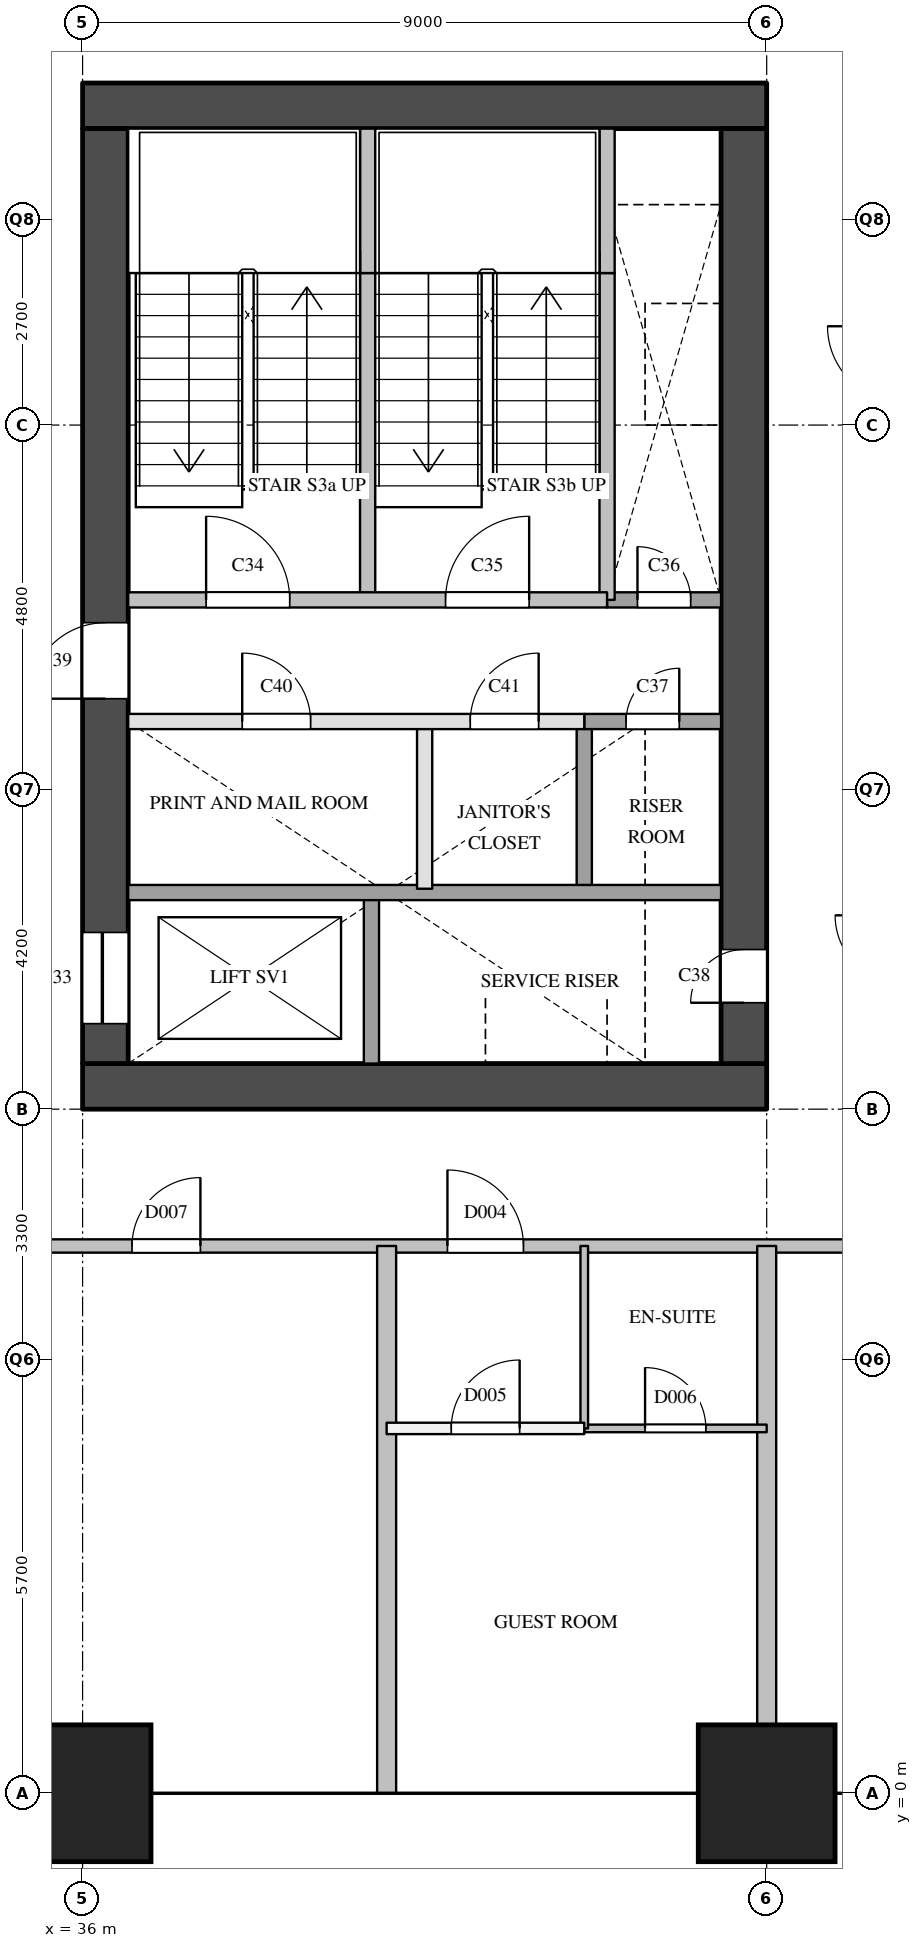
"""IFC4 building model, lengths in metres.
Left out: names, types, materials, properties, quantities, classifications, styles, units other than length and angle.
Written with IfcOpenShell. Run it as: python <this file> out.ifc"""

import sys

from ifc_helpers import new_model, si_unit, direction, frame, frame_2d, origin, origin_2d, place, context, subcontext, project, spatial, rectangle, extrude, element, fill, save


model = new_model("IFC4")
c1 = context("Model", 3, precision=1e-05, world=origin(), true_north=direction((0.0, 1.0)))
c2 = subcontext(c1, "Body", "Model", "MODEL_VIEW")
j1 = project(units=[si_unit("LENGTHUNIT", "METRE"), si_unit("PLANEANGLEUNIT", "RADIAN")], contexts=[c1])
p1 = place(None, origin())
s1 = spatial("IfcSite", under=j1, at=p1, CompositionType="ELEMENT")
p2 = place(p1, origin())
s2 = spatial("IfcBuilding", under=s1, at=p2, CompositionType="ELEMENT")
p3 = place(p2, frame((0.0, 0.0, 42.4)))
s3 = spatial("IfcBuildingStorey", under=s2, at=p3, CompositionType="ELEMENT", Elevation=42.4)
for number, where, z_axis, x_axis in (
    (1, (36.0, 0.0, 0.0), (0.0, 0.0, 1.0), (1.0, 0.0, 0.0)),
    (2, (45.0, 0.0, 0.0), (0.0, 0.0, 1.0), (1.0, 0.0, 0.0)),
):
    element("IfcColumn", number, at=place(p3, frame(where, z_axis=z_axis, x_axis=x_axis)), inside=s3, PredefinedType="COLUMN", context=c2, shape_type="SweptSolid", body=[
        extrude(rectangle(XDim=1.8, YDim=1.8, at=origin_2d()), origin(), (0.0, 0.0, 1.0), 3.8),
    ])
for number, where, z_axis, x_axis in (
    (3, (36.0, 9.3, 0.0), (0.0, 0.0, 1.0), (1.0, 0.0, 0.0)),
    (4, (36.0, 22.2, 0.0), (0.0, 0.0, 1.0), (1.0, 0.0, 0.0)),
):
    element("IfcWall", number, at=place(p3, frame(where, z_axis=z_axis, x_axis=x_axis)), inside=s3, PredefinedType="SHEAR", context=c2, shape_type="SweptSolid", body=[
        extrude(rectangle(XDim=9.0, YDim=0.6, at=frame_2d((4.5, 0.0))), origin(), (0.0, 0.0, 1.0), 3.5),
    ])
p4 = place(p3, frame((36.3, 9.6, 0.0), z_axis=(0.0, 0.0, 1.0), x_axis=(0.0, 1.0, 0.0)))
e5 = element("IfcWall", 5, at=p4, inside=s3, PredefinedType="SHEAR", context=c2, shape_type="SweptSolid", body=[
    extrude(rectangle(XDim=12.3, YDim=0.6, at=frame_2d((6.15, 0.0))), origin(), (0.0, 0.0, 1.0), 3.5),
])
p5 = place(p4, frame((0.525, 0.0, 0.0)))
e6 = element("IfcOpeningElement", 6, at=p5, cuts=e5, PredefinedType="OPENING", context=c2, shape_type="SweptSolid", body=[
    extrude(rectangle(XDim=1.2, YDim=2.1, at=frame_2d((0.6, 1.05))), frame((0.0, 0.31, 0.0), z_axis=(0.0, -1.0, 0.0), x_axis=(1.0, 0.0, 0.0)), (0.0, 0.0, 1.0), 0.62),
])
p6 = place(p4, frame((4.8, 0.0, 0.0)))
e7 = element("IfcOpeningElement", 7, at=p6, cuts=e5, PredefinedType="OPENING", context=c2, shape_type="SweptSolid", body=[
    extrude(rectangle(XDim=1.0, YDim=2.1, at=frame_2d((0.5, 1.05))), frame((0.0, 0.31, 0.0), z_axis=(0.0, -1.0, 0.0), x_axis=(1.0, 0.0, 0.0)), (0.0, 0.0, 1.0), 0.62),
])
p7 = place(p3, frame((44.7, 9.6, 0.0), z_axis=(0.0, 0.0, 1.0), x_axis=(0.0, 1.0, 0.0)))
e8 = element("IfcWall", 8, at=p7, inside=s3, PredefinedType="SHEAR", context=c2, shape_type="SweptSolid", body=[
    extrude(rectangle(XDim=12.3, YDim=0.6, at=frame_2d((6.15, 0.0))), origin(), (0.0, 0.0, 1.0), 3.5),
])
p8 = place(p7, frame((0.8, 0.0, 0.0)))
e9 = element("IfcOpeningElement", 9, at=p8, cuts=e8, PredefinedType="OPENING", context=c2, shape_type="SweptSolid", body=[
    extrude(rectangle(XDim=0.7, YDim=2.1, at=frame_2d((0.35, 1.05))), frame((0.0, 0.31, 0.0), z_axis=(0.0, -1.0, 0.0), x_axis=(1.0, 0.0, 0.0)), (0.0, 0.0, 1.0), 0.62),
])
p9 = place(p3, frame((39.75, 15.7, 0.0), z_axis=(0.0, 0.0, 1.0), x_axis=(0.0, 1.0, 0.0)))
e10 = element("IfcWall", 10, at=p9, inside=s3, PredefinedType="SOLIDWALL", context=c2, shape_type="SweptSolid", body=[
    extrude(rectangle(XDim=4.3, YDim=0.2, at=frame_2d((2.15, 0.0))), origin(), (0.0, 0.0, 1.0), 3.5),
])
p10 = place(p3, frame((39.75, 20.0, 0.0), z_axis=(0.0, 0.0, 1.0), x_axis=(0.0, 1.0, 0.0)))
e11 = element("IfcWall", 11, at=p10, inside=s3, PredefinedType="SOLIDWALL", context=c2, shape_type="SweptSolid", body=[
    extrude(rectangle(XDim=1.9, YDim=0.2, at=frame_2d((0.95, 0.0))), origin(), (0.0, 0.0, 1.0), 3.5),
])
p11 = place(p3, frame((39.8, 9.6, 0.0), z_axis=(0.0, 0.0, 1.0), x_axis=(0.0, 1.0, 0.0)))
e12 = element("IfcWall", 12, at=p11, inside=s3, PredefinedType="SOLIDWALL", context=c2, shape_type="SweptSolid", body=[
    extrude(rectangle(XDim=2.3, YDim=0.2, at=frame_2d((1.15, 0.0))), origin(), (0.0, 0.0, 1.0), 3.5),
])
p12 = place(p3, frame((40.5, 11.9, 0.0), z_axis=(0.0, 0.0, 1.0), x_axis=(0.0, 1.0, 0.0)))
e13 = element("IfcWall", 13, at=p12, inside=s3, PredefinedType="PARTITIONING", context=c2, shape_type="SweptSolid", body=[
    extrude(rectangle(XDim=2.2, YDim=0.2, at=frame_2d((1.1, 0.0))), origin(), (0.0, 0.0, 1.0), 3.5),
])
p13 = place(p3, frame((42.6, 11.9, 0.0), z_axis=(0.0, 0.0, 1.0), x_axis=(0.0, 1.0, 0.0)))
e14 = element("IfcWall", 14, at=p13, inside=s3, PredefinedType="SOLIDWALL", context=c2, shape_type="SweptSolid", body=[
    extrude(rectangle(XDim=2.2, YDim=0.2, at=frame_2d((1.1, 0.0))), origin(), (0.0, 0.0, 1.0), 3.5),
])
p14 = place(p3, frame((42.9, 15.7, 0.0), z_axis=(0.0, 0.0, 1.0), x_axis=(0.0, 1.0, 0.0)))
e15 = element("IfcWall", 15, at=p14, inside=s3, PredefinedType="SOLIDWALL", context=c2, shape_type="SweptSolid", body=[
    extrude(rectangle(XDim=4.3, YDim=0.2, at=frame_2d((2.15, 0.0))), origin(), (0.0, 0.0, 1.0), 3.5),
])
p15 = place(p3, frame((42.9, 20.0, 0.0), z_axis=(0.0, 0.0, 1.0), x_axis=(0.0, 1.0, 0.0)))
e16 = element("IfcWall", 16, at=p15, inside=s3, PredefinedType="SOLIDWALL", context=c2, shape_type="SweptSolid", body=[
    extrude(rectangle(XDim=1.9, YDim=0.2, at=frame_2d((0.95, 0.0))), origin(), (0.0, 0.0, 1.0), 3.5),
])
p16 = place(p3, frame((36.6, 11.85, 0.0), z_axis=(0.0, 0.0, 1.0), x_axis=(1.0, 0.0, 0.0)))
e17 = element("IfcWall", 17, at=p16, inside=s3, PredefinedType="SOLIDWALL", context=c2, shape_type="SweptSolid", body=[
    extrude(rectangle(XDim=7.8, YDim=0.2, at=frame_2d((3.9, 0.0))), origin(), (0.0, 0.0, 1.0), 3.5),
])
p17 = place(p3, frame((36.6, 14.1, 0.0), z_axis=(0.0, 0.0, 1.0), x_axis=(1.0, 0.0, 0.0)))
e18 = element("IfcWall", 18, at=p17, inside=s3, PredefinedType="PARTITIONING", context=c2, shape_type="SweptSolid", body=[
    extrude(rectangle(XDim=6.0, YDim=0.2, at=frame_2d((3.0, 0.0))), origin(), (0.0, 0.0, 1.0), 3.5),
])
p18 = place(p17, frame((1.5, 0.0, 0.0)))
e19 = element("IfcOpeningElement", 19, at=p18, cuts=e18, PredefinedType="OPENING", context=c2, shape_type="SweptSolid", body=[
    extrude(rectangle(XDim=0.9, YDim=2.1, at=frame_2d((0.45, 1.05))), frame((0.0, 0.11, 0.0), z_axis=(0.0, -1.0, 0.0), x_axis=(1.0, 0.0, 0.0)), (0.0, 0.0, 1.0), 0.22),
])
p19 = place(p17, frame((4.5, 0.0, 0.0)))
e20 = element("IfcOpeningElement", 20, at=p19, cuts=e18, PredefinedType="OPENING", context=c2, shape_type="SweptSolid", body=[
    extrude(rectangle(XDim=0.9, YDim=2.1, at=frame_2d((0.45, 1.05))), frame((0.0, 0.11, 0.0), z_axis=(0.0, -1.0, 0.0), x_axis=(1.0, 0.0, 0.0)), (0.0, 0.0, 1.0), 0.22),
])
p20 = place(p3, frame((42.6, 14.1, 0.0), z_axis=(0.0, 0.0, 1.0), x_axis=(1.0, 0.0, 0.0)))
e21 = element("IfcWall", 21, at=p20, inside=s3, PredefinedType="SOLIDWALL", context=c2, shape_type="SweptSolid", body=[
    extrude(rectangle(XDim=1.8, YDim=0.2, at=frame_2d((0.9, 0.0))), origin(), (0.0, 0.0, 1.0), 3.5),
])
p21 = place(p20, frame((0.55, 0.0, 0.0)))
e22 = element("IfcOpeningElement", 22, at=p21, cuts=e21, PredefinedType="OPENING", context=c2, shape_type="SweptSolid", body=[
    extrude(rectangle(XDim=0.7, YDim=2.1, at=frame_2d((0.35, 1.05))), frame((0.0, 0.11, 0.0), z_axis=(0.0, -1.0, 0.0), x_axis=(1.0, 0.0, 0.0)), (0.0, 0.0, 1.0), 0.22),
])
p22 = place(p3, frame((42.9, 15.7, 0.0), z_axis=(0.0, 0.0, 1.0), x_axis=(1.0, 0.0, 0.0)))
e23 = element("IfcWall", 23, at=p22, inside=s3, PredefinedType="SOLIDWALL", context=c2, shape_type="SweptSolid", body=[
    extrude(rectangle(XDim=1.5, YDim=0.2, at=frame_2d((0.75, 0.0))), origin(), (0.0, 0.0, 1.0), 3.5),
])
p23 = place(p22, frame((0.4, 0.0, 0.0)))
e24 = element("IfcOpeningElement", 24, at=p23, cuts=e23, PredefinedType="OPENING", context=c2, shape_type="SweptSolid", body=[
    extrude(rectangle(XDim=0.7, YDim=2.1, at=frame_2d((0.35, 1.05))), frame((0.0, 0.11, 0.0), z_axis=(0.0, -1.0, 0.0), x_axis=(1.0, 0.0, 0.0)), (0.0, 0.0, 1.0), 0.22),
])
p24 = place(p3, frame((36.6, 15.7, 0.0), z_axis=(0.0, 0.0, 1.0), x_axis=(1.0, 0.0, 0.0)))
e25 = element("IfcWall", 25, at=p24, inside=s3, PredefinedType="SOLIDWALL", context=c2, shape_type="SweptSolid", body=[
    extrude(rectangle(XDim=6.3, YDim=0.2, at=frame_2d((3.15, 0.0))), origin(), (0.0, 0.0, 1.0), 3.5),
])
p25 = place(p24, frame((1.025, 0.0, 0.0)))
e26 = element("IfcOpeningElement", 26, at=p25, cuts=e25, PredefinedType="OPENING", context=c2, shape_type="SweptSolid", body=[
    extrude(rectangle(XDim=1.1, YDim=2.1, at=frame_2d((0.55, 1.05))), frame((0.0, 0.11, 0.0), z_axis=(0.0, -1.0, 0.0), x_axis=(1.0, 0.0, 0.0)), (0.0, 0.0, 1.0), 0.22),
])
p26 = place(p24, frame((4.175, 0.0, 0.0)))
e27 = element("IfcOpeningElement", 27, at=p26, cuts=e25, PredefinedType="OPENING", context=c2, shape_type="SweptSolid", body=[
    extrude(rectangle(XDim=1.1, YDim=2.1, at=frame_2d((0.55, 1.05))), frame((0.0, 0.11, 0.0), z_axis=(0.0, -1.0, 0.0), x_axis=(1.0, 0.0, 0.0)), (0.0, 0.0, 1.0), 0.22),
])
p27 = place(p3, frame((34.2, 7.2, 0.0), z_axis=(0.0, 0.0, 1.0), x_axis=(1.0, 0.0, 0.0)))
e28 = element("IfcWall", 28, at=p27, inside=s3, PredefinedType="PARTITIONING", context=c2, shape_type="SweptSolid", body=[
    extrude(rectangle(XDim=12.6, YDim=0.175, at=frame_2d((6.3, 0.0))), origin(), (0.0, 0.0, 1.0), 3.5),
])
p28 = place(p27, frame((6.6, 0.0, 0.0)))
e29 = element("IfcOpeningElement", 29, at=p28, cuts=e28, PredefinedType="OPENING", context=c2, shape_type="SweptSolid", body=[
    extrude(rectangle(XDim=1.0, YDim=2.1, at=frame_2d((0.5, 1.05))), frame((0.0, 0.097, 0.0), z_axis=(0.0, -1.0, 0.0), x_axis=(1.0, 0.0, 0.0)), (0.0, 0.0, 1.0), 0.195),
])
p29 = place(p27, frame((2.45, 0.0, 0.0)))
e30 = element("IfcOpeningElement", 30, at=p29, cuts=e28, PredefinedType="OPENING", context=c2, shape_type="SweptSolid", body=[
    extrude(rectangle(XDim=0.9, YDim=2.1, at=frame_2d((0.45, 1.05))), frame((0.0, 0.097, 0.0), z_axis=(0.0, -1.0, 0.0), x_axis=(1.0, 0.0, 0.0)), (0.0, 0.0, 1.0), 0.195),
])
p30 = place(p3, frame((40.0, 4.8, 0.0), z_axis=(0.0, 0.0, 1.0), x_axis=(1.0, 0.0, 0.0)))
e31 = element("IfcWall", 31, at=p30, inside=s3, PredefinedType="PARTITIONING", context=c2, shape_type="SweptSolid", body=[
    extrude(rectangle(XDim=2.6, YDim=0.15, at=frame_2d((1.3, 0.0))), origin(), (0.0, 0.0, 1.0), 3.5),
])
p31 = place(p30, frame((0.85, 0.0, 0.0)))
e32 = element("IfcOpeningElement", 32, at=p31, cuts=e31, PredefinedType="OPENING", context=c2, shape_type="SweptSolid", body=[
    extrude(rectangle(XDim=0.9, YDim=2.1, at=frame_2d((0.45, 1.05))), frame((0.0, 0.085, 0.0), z_axis=(0.0, -1.0, 0.0), x_axis=(1.0, 0.0, 0.0)), (0.0, 0.0, 1.0), 0.17),
])
p32 = place(p3, frame((40.0, 0.0, 0.0), z_axis=(0.0, 0.0, 1.0), x_axis=(0.0, 1.0, 0.0)))
e33 = element("IfcWall", 33, at=p32, inside=s3, PredefinedType="PARTITIONING", context=c2, shape_type="SweptSolid", body=[
    extrude(rectangle(XDim=7.2, YDim=0.25, at=frame_2d((3.6, 0.0))), origin(), (0.0, 0.0, 1.0), 2.5),
])
p33 = place(p3, frame((45.0, 0.0, 0.0), z_axis=(0.0, 0.0, 1.0), x_axis=(0.0, 1.0, 0.0)))
e34 = element("IfcWall", 34, at=p33, inside=s3, PredefinedType="PARTITIONING", context=c2, shape_type="SweptSolid", body=[
    extrude(rectangle(XDim=7.2, YDim=0.25, at=frame_2d((3.6, 0.0))), origin(), (0.0, 0.0, 1.0), 3.5),
])
p34 = place(p3, frame((42.6, 4.8, 0.0), z_axis=(0.0, 0.0, 1.0), x_axis=(1.0, 0.0, 0.0)))
e35 = element("IfcWall", 35, at=p34, inside=s3, PredefinedType="PARTITIONING", context=c2, shape_type="SweptSolid", body=[
    extrude(rectangle(XDim=2.4, YDim=0.1, at=frame_2d((1.2, 0.0))), origin(), (0.0, 0.0, 1.0), 3.5),
])
p35 = place(p34, frame((0.8, 0.0, 0.0)))
e36 = element("IfcOpeningElement", 36, at=p35, cuts=e35, PredefinedType="OPENING", context=c2, shape_type="SweptSolid", body=[
    extrude(rectangle(XDim=0.8, YDim=2.1, at=frame_2d((0.4, 1.05))), frame((0.0, 0.06, 0.0), z_axis=(0.0, -1.0, 0.0), x_axis=(1.0, 0.0, 0.0)), (0.0, 0.0, 1.0), 0.12),
])
p36 = place(p3, frame((42.6, 4.8, 0.0), z_axis=(0.0, 0.0, 1.0), x_axis=(0.0, 1.0, 0.0)))
e37 = element("IfcWall", 37, at=p36, inside=s3, PredefinedType="PARTITIONING", context=c2, shape_type="SweptSolid", body=[
    extrude(rectangle(XDim=2.4, YDim=0.1, at=frame_2d((1.2, 0.0))), origin(), (0.0, 0.0, 1.0), 3.5),
])
p37 = place(p5, origin())
e38 = element("IfcDoor", 38, at=p37, inside=s3, OperationType="SLIDING_TO_LEFT", PredefinedType="DOOR", context=c2, shape_type="SweptSolid", body=[
    extrude(rectangle(XDim=1.2, YDim=2.1, at=frame_2d((0.6, 1.05))), frame((0.0, 0.025, 0.0), z_axis=(0.0, -1.0, 0.0), x_axis=(1.0, 0.0, 0.0)), (0.0, 0.0, 1.0), 0.05),
])
fill(e6, e38)
p38 = place(p25, origin())
e39 = element("IfcDoor", 39, at=p38, inside=s3, OperationType="SINGLE_SWING_LEFT", PredefinedType="DOOR", context=c2, shape_type="SweptSolid", body=[
    extrude(rectangle(XDim=1.1, YDim=2.1, at=frame_2d((0.55, 1.05))), frame((0.0, 0.025, 0.0), z_axis=(0.0, -1.0, 0.0), x_axis=(1.0, 0.0, 0.0)), (0.0, 0.0, 1.0), 0.05),
])
fill(e26, e39)
p39 = place(p26, origin())
e40 = element("IfcDoor", 40, at=p39, inside=s3, OperationType="SINGLE_SWING_RIGHT", PredefinedType="DOOR", context=c2, shape_type="SweptSolid", body=[
    extrude(rectangle(XDim=1.1, YDim=2.1, at=frame_2d((0.55, 1.05))), frame((0.0, 0.025, 0.0), z_axis=(0.0, -1.0, 0.0), x_axis=(1.0, 0.0, 0.0)), (0.0, 0.0, 1.0), 0.05),
])
fill(e27, e40)
p40 = place(p23, origin())
e41 = element("IfcDoor", 41, at=p40, inside=s3, OperationType="SINGLE_SWING_LEFT", PredefinedType="DOOR", context=c2, shape_type="SweptSolid", body=[
    extrude(rectangle(XDim=0.7, YDim=2.1, at=frame_2d((0.35, 1.05))), frame((0.0, 0.025, 0.0), z_axis=(0.0, -1.0, 0.0), x_axis=(1.0, 0.0, 0.0)), (0.0, 0.0, 1.0), 0.05),
])
fill(e24, e41)
p41 = place(p21, origin())
e42 = element("IfcDoor", 42, at=p41, inside=s3, OperationType="SINGLE_SWING_RIGHT", PredefinedType="DOOR", context=c2, shape_type="SweptSolid", body=[
    extrude(rectangle(XDim=0.7, YDim=2.1, at=frame_2d((0.35, 1.05))), frame((0.0, 0.025, 0.0), z_axis=(0.0, -1.0, 0.0), x_axis=(1.0, 0.0, 0.0)), (0.0, 0.0, 1.0), 0.05),
])
fill(e22, e42)
p42 = place(p8, origin())
e43 = element("IfcDoor", 43, at=p42, inside=s3, OperationType="SINGLE_SWING_LEFT", PredefinedType="DOOR", context=c2, shape_type="SweptSolid", body=[
    extrude(rectangle(XDim=0.7, YDim=2.1, at=frame_2d((0.35, 1.05))), frame((0.0, 0.025, 0.0), z_axis=(0.0, -1.0, 0.0), x_axis=(1.0, 0.0, 0.0)), (0.0, 0.0, 1.0), 0.05),
])
fill(e9, e43)
p43 = place(p6, origin())
e44 = element("IfcDoor", 44, at=p43, inside=s3, OperationType="SINGLE_SWING_LEFT", PredefinedType="DOOR", context=c2, shape_type="SweptSolid", body=[
    extrude(rectangle(XDim=1.0, YDim=2.1, at=frame_2d((0.5, 1.05))), frame((0.0, 0.025, 0.0), z_axis=(0.0, -1.0, 0.0), x_axis=(1.0, 0.0, 0.0)), (0.0, 0.0, 1.0), 0.05),
])
fill(e7, e44)
p44 = place(p18, origin())
e45 = element("IfcDoor", 45, at=p44, inside=s3, OperationType="SINGLE_SWING_LEFT", PredefinedType="DOOR", context=c2, shape_type="SweptSolid", body=[
    extrude(rectangle(XDim=0.9, YDim=2.1, at=frame_2d((0.45, 1.05))), frame((0.0, 0.025, 0.0), z_axis=(0.0, -1.0, 0.0), x_axis=(1.0, 0.0, 0.0)), (0.0, 0.0, 1.0), 0.05),
])
fill(e19, e45)
p45 = place(p19, origin())
e46 = element("IfcDoor", 46, at=p45, inside=s3, OperationType="SINGLE_SWING_RIGHT", PredefinedType="DOOR", context=c2, shape_type="SweptSolid", body=[
    extrude(rectangle(XDim=0.9, YDim=2.1, at=frame_2d((0.45, 1.05))), frame((0.0, 0.025, 0.0), z_axis=(0.0, -1.0, 0.0), x_axis=(1.0, 0.0, 0.0)), (0.0, 0.0, 1.0), 0.05),
])
fill(e20, e46)
p46 = place(p28, origin())
e47 = element("IfcDoor", 47, at=p46, inside=s3, OperationType="SINGLE_SWING_LEFT", PredefinedType="DOOR", context=c2, shape_type="SweptSolid", body=[
    extrude(rectangle(XDim=1.0, YDim=2.1, at=frame_2d((0.5, 1.05))), frame((0.0, 0.025, 0.0), z_axis=(0.0, -1.0, 0.0), x_axis=(1.0, 0.0, 0.0)), (0.0, 0.0, 1.0), 0.05),
])
fill(e29, e47)
p47 = place(p31, origin())
e48 = element("IfcDoor", 48, at=p47, inside=s3, OperationType="SINGLE_SWING_RIGHT", PredefinedType="DOOR", context=c2, shape_type="SweptSolid", body=[
    extrude(rectangle(XDim=0.9, YDim=2.1, at=frame_2d((0.45, 1.05))), frame((0.0, 0.025, 0.0), z_axis=(0.0, -1.0, 0.0), x_axis=(1.0, 0.0, 0.0)), (0.0, 0.0, 1.0), 0.05),
])
fill(e32, e48)
p48 = place(p35, origin())
e49 = element("IfcDoor", 49, at=p48, inside=s3, OperationType="SINGLE_SWING_LEFT", PredefinedType="DOOR", context=c2, shape_type="SweptSolid", body=[
    extrude(rectangle(XDim=0.8, YDim=2.1, at=frame_2d((0.4, 1.05))), frame((0.0, 0.025, 0.0), z_axis=(0.0, -1.0, 0.0), x_axis=(1.0, 0.0, 0.0)), (0.0, 0.0, 1.0), 0.05),
])
fill(e36, e49)
p49 = place(p29, origin())
e50 = element("IfcDoor", 50, at=p49, inside=s3, OperationType="SINGLE_SWING_RIGHT", PredefinedType="DOOR", context=c2, shape_type="SweptSolid", body=[
    extrude(rectangle(XDim=0.9, YDim=2.1, at=frame_2d((0.45, 1.05))), frame((0.0, 0.025, 0.0), z_axis=(0.0, -1.0, 0.0), x_axis=(1.0, 0.0, 0.0)), (0.0, 0.0, 1.0), 0.05),
])
fill(e30, e50)
save(model, sys.argv[1])
